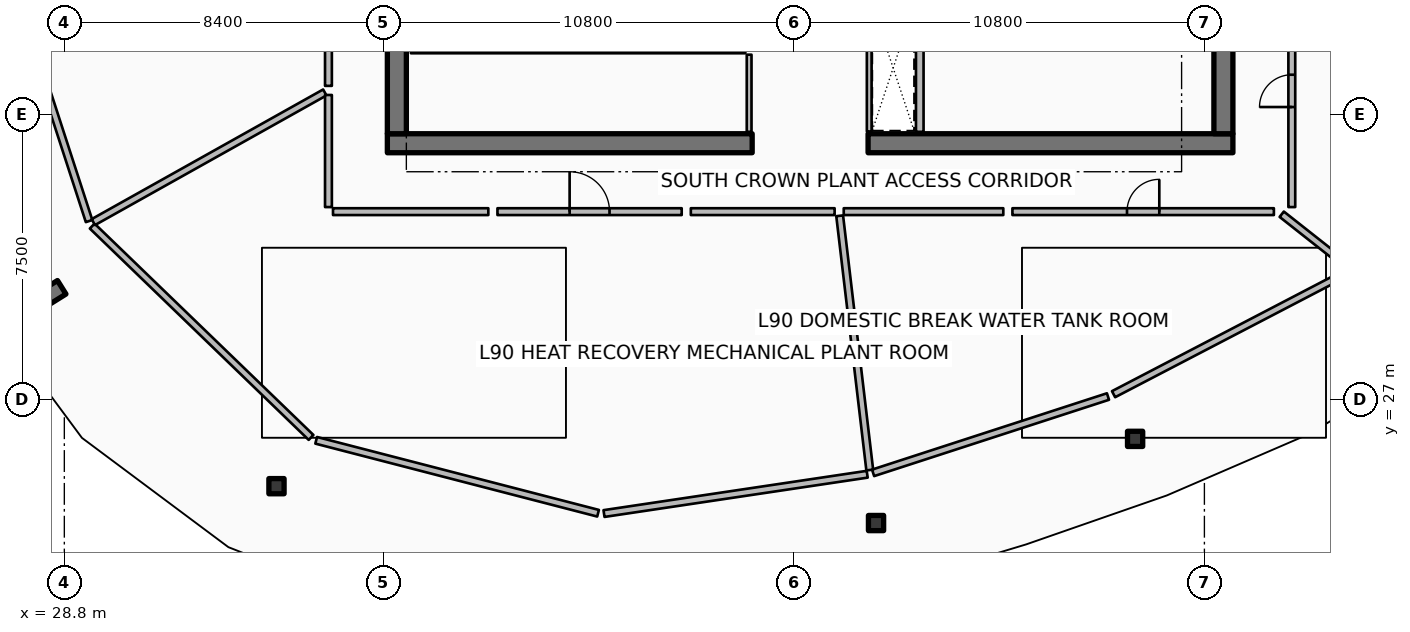
"""IFC4 building model, lengths in metres.
Left out: names, types, materials, properties, quantities, classifications, styles, units other than length and angle.
Written with IfcOpenShell. Run it as: python <this file> out.ifc"""

import sys

from ifc_helpers import new_model, si_unit, direction, frame, frame_2d, origin, origin_2d, place, context, subcontext, project, spatial, rectangle, hollow_rectangle, extrude, element, fill, save


model = new_model("IFC4")
c1 = context("Model", 3, precision=1e-05, world=origin(), true_north=direction((0.0, 1.0)))
c2 = subcontext(c1, "Body", "Model", "MODEL_VIEW")
j1 = project(units=[si_unit("LENGTHUNIT", "METRE"), si_unit("PLANEANGLEUNIT", "RADIAN")], contexts=[c1])
p1 = place(None, origin())
s1 = spatial("IfcSite", under=j1, at=p1, CompositionType="ELEMENT")
p2 = place(p1, origin())
s2 = spatial("IfcBuilding", under=s1, at=p2, CompositionType="ELEMENT")
p3 = place(p2, frame((0.0, 0.0, 359.6)))
s3 = spatial("IfcBuildingStorey", under=s2, at=p3, CompositionType="ELEMENT", Elevation=359.6)
p4 = place(p3, frame((37.3, 33.75, 0.0), z_axis=(0.0, 0.0, 1.0), x_axis=(1.0, 0.0, 0.0)))
e1 = element("IfcWall", 1, at=p4, inside=s3, PredefinedType="SHEAR", context=c2, shape_type="SweptSolid", body=[
    extrude(rectangle(XDim=9.6, YDim=0.5, at=frame_2d((4.8, 0.0))), origin(), (0.0, 0.0, 1.0), 3.6),
])
p5 = place(p3, frame((49.95, 33.75, 0.0), z_axis=(0.0, 0.0, 1.0), x_axis=(1.0, 0.0, 0.0)))
e2 = element("IfcWall", 2, at=p5, inside=s3, PredefinedType="SHEAR", context=c2, shape_type="SweptSolid", body=[
    extrude(rectangle(XDim=9.6, YDim=0.5, at=frame_2d((4.8, 0.0))), origin(), (0.0, 0.0, 1.0), 3.6),
])
for number, where, z_axis, x_axis in (
    (3, (37.55, 34.0, 0.0), (0.0, 0.0, 1.0), (0.0, 1.0, 0.0)),
    (4, (59.3, 34.0, 0.0), (0.0, 0.0, 1.0), (0.0, 1.0, 0.0)),
):
    element("IfcWall", number, at=place(p3, frame(where, z_axis=z_axis, x_axis=x_axis)), inside=s3, PredefinedType="SHEAR", context=c2, shape_type="SweptSolid", body=[
        extrude(rectangle(XDim=16.0, YDim=0.5, at=frame_2d((8.0, 0.0))), origin(), (0.0, 0.0, 1.0), 3.6),
    ])
p6 = place(p3, frame((28.731, 29.959, 0.0), z_axis=(0.0, 0.0, 1.0), x_axis=(-0.848033572426, -0.529942506352, 0.0)))
e5 = element("IfcWall", 5, at=p6, inside=s3, PredefinedType="SOLIDWALL", context=c2, shape_type="SweptSolid", body=[
    extrude(rectangle(XDim=3.5, YDim=0.42, at=frame_2d((1.75, 0.0))), origin(), (0.0, 0.0, 1.0), 3.6),
])
for number, where, z_axis, x_axis in (
    (6, (34.383, 24.726, 0.0), (0.0, 0.0, 1.0), (1.0, 0.0, 0.0)),
    (7, (50.159, 23.756, 0.0), (0.0, 0.0, 1.0), (1.0, 0.0, 0.0)),
    (8, (56.977, 25.971, 0.0), (0.0, 0.0, 1.0), (1.0, 0.0, 0.0)),
):
    element("IfcColumn", number, at=place(p3, frame(where, z_axis=z_axis, x_axis=x_axis)), inside=s3, PredefinedType="COLUMN", context=c2, shape_type="SweptSolid", body=[
        extrude(hollow_rectangle(XDim=0.4, YDim=0.4, WallThickness=0.02, InnerFilletRadius=0.02, OuterFilletRadius=0.04, at=origin_2d()), origin(), (0.0, 0.0, 1.0), 3.32),
    ])
p7 = place(p3, frame((51.31, 34.05, 0.0), z_axis=(0.0, 0.0, 1.0), x_axis=(0.0, 1.0, 0.0)))
e9 = element("IfcWall", 9, at=p7, inside=s3, PredefinedType="PARTITIONING", context=c2, shape_type="SweptSolid", body=[
    extrude(rectangle(XDim=3.21, YDim=0.2, at=frame_2d((1.605, 0.0))), origin(), (0.0, 0.0, 1.0), 3.32),
])
p8 = place(p3, frame((46.82, 34.05, 0.0), z_axis=(0.0, 0.0, 1.0), x_axis=(0.0, 1.0, 0.0)))
e10 = element("IfcWall", 10, at=p8, inside=s3, PredefinedType="PARTITIONING", context=c2, shape_type="SweptSolid", body=[
    extrude(rectangle(XDim=2.03, YDim=0.125, at=frame_2d((1.015, 0.0))), origin(), (0.0, 0.0, 1.0), 2.76),
])
p9 = place(p3, frame((37.92, 36.18, 0.0), z_axis=(0.0, 0.0, 1.0), x_axis=(1.0, 0.0, 0.0)))
e11 = element("IfcWall", 11, at=p9, inside=s3, PredefinedType="PARTITIONING", context=c2, shape_type="SweptSolid", body=[
    extrude(rectangle(XDim=8.8, YDim=0.125, at=frame_2d((4.4, 0.0))), origin(), (0.0, 0.0, 1.0), 2.76),
])
p10 = place(p9, frame((3.975, 0.0, 0.0)))
e12 = element("IfcOpeningElement", 12, at=p10, cuts=e11, PredefinedType="OPENING", context=c2, shape_type="SweptSolid", body=[
    extrude(rectangle(XDim=0.85, YDim=2.06, at=frame_2d((0.425, 1.03))), frame((0.0, 0.073, 0.0), z_axis=(0.0, -1.0, 0.0), x_axis=(1.0, 0.0, 0.0)), (0.0, 0.0, 1.0), 0.145),
])
p11 = place(p3, frame((49.98, 34.06, 0.0), z_axis=(0.0, 0.0, 1.0), x_axis=(0.0, 1.0, 0.0)))
e13 = element("IfcWall", 13, at=p11, inside=s3, PredefinedType="PARTITIONING", context=c2, shape_type="SweptSolid", body=[
    extrude(rectangle(XDim=3.4, YDim=0.125, at=frame_2d((1.7, 0.0))), origin(), (0.0, 0.0, 1.0), 2.76),
])
p12 = place(p3, frame((26.941, 39.428, 0.0), z_axis=(0.0, 0.0, 1.0), x_axis=(0.309024234991, -0.951054163646, 0.0)))
e14 = element("IfcWall", 14, at=p12, inside=s3, PredefinedType="PARTITIONING", context=c2, shape_type="SweptSolid", body=[
    extrude(rectangle(XDim=8.124, YDim=0.18, at=frame_2d((4.062, 0.0))), origin(), (0.0, 0.0, 1.0), 2.76),
])
p13 = place(p3, frame((29.533, 31.57, 0.0), z_axis=(0.0, 0.0, 1.0), x_axis=(0.719364153135, -0.694633151516, 0.0)))
e15 = element("IfcWall", 15, at=p13, inside=s3, PredefinedType="PARTITIONING", context=c2, shape_type="SweptSolid", body=[
    extrude(rectangle(XDim=8.006, YDim=0.18, at=frame_2d((4.003, 0.0))), origin(), (0.0, 0.0, 1.0), 2.76),
])
p14 = place(p3, frame((35.427, 25.934, 0.0), z_axis=(0.0, 0.0, 1.0), x_axis=(0.968117205342, -0.250497658115, 0.0)))
e16 = element("IfcWall", 16, at=p14, inside=s3, PredefinedType="PARTITIONING", context=c2, shape_type="SweptSolid", body=[
    extrude(rectangle(XDim=7.662, YDim=0.18, at=frame_2d((3.831, 0.0))), origin(), (0.0, 0.0, 1.0), 2.76),
])
p15 = place(p3, frame((43.001, 24.006, 0.0), z_axis=(0.0, 0.0, 1.0), x_axis=(0.989034336252, 0.147685753256, 0.0)))
e17 = element("IfcWall", 17, at=p15, inside=s3, PredefinedType="PARTITIONING", context=c2, shape_type="SweptSolid", body=[
    extrude(rectangle(XDim=7.003, YDim=0.18, at=frame_2d((3.501, 0.0))), origin(), (0.0, 0.0, 1.0), 2.76),
])
p16 = place(p3, frame((50.082, 25.077, 0.0), z_axis=(0.0, 0.0, 1.0), x_axis=(0.95105283999, 0.309028308649, 0.0)))
e18 = element("IfcWall", 18, at=p16, inside=s3, PredefinedType="PARTITIONING", context=c2, shape_type="SweptSolid", body=[
    extrude(rectangle(XDim=6.499, YDim=0.18, at=frame_2d((3.25, 0.0))), origin(), (0.0, 0.0, 1.0), 2.76),
])
p17 = place(p3, frame((56.41, 27.147, 0.0), z_axis=(0.0, 0.0, 1.0), x_axis=(0.886949494865, 0.461866423935, 0.0)))
e19 = element("IfcWall", 19, at=p17, inside=s3, PredefinedType="PARTITIONING", context=c2, shape_type="SweptSolid", body=[
    extrude(rectangle(XDim=7.002, YDim=0.18, at=frame_2d((3.501, 0.0))), origin(), (0.0, 0.0, 1.0), 2.76),
])
p18 = place(p3, frame((35.75, 40.43, 0.0), z_axis=(0.0, 0.0, 1.0), x_axis=(0.0, -1.0, 0.0)))
e20 = element("IfcWall", 20, at=p18, inside=s3, PredefinedType="PARTITIONING", context=c2, shape_type="SweptSolid", body=[
    extrude(rectangle(XDim=5.17, YDim=0.18, at=frame_2d((2.585, 0.0))), origin(), (0.0, 0.0, 1.0), 2.76),
])
p19 = place(p18, frame((2.16, 0.0, 0.0)))
e21 = element("IfcOpeningElement", 21, at=p19, cuts=e20, PredefinedType="OPENING", context=c2, shape_type="SweptSolid", body=[
    extrude(rectangle(XDim=0.85, YDim=2.06, at=frame_2d((0.425, 1.03))), frame((0.0, 0.1, 0.0), z_axis=(0.0, -1.0, 0.0), x_axis=(1.0, 0.0, 0.0)), (0.0, 0.0, 1.0), 0.2),
])
p20 = place(p3, frame((35.654, 35.086, 0.0), z_axis=(0.0, 0.0, 1.0), x_axis=(-0.872497667023, -0.488618277432, 0.0)))
e22 = element("IfcWall", 22, at=p20, inside=s3, PredefinedType="PARTITIONING", context=c2, shape_type="SweptSolid", body=[
    extrude(rectangle(XDim=6.981, YDim=0.18, at=frame_2d((3.491, 0.0))), origin(), (0.0, 0.0, 1.0), 2.76),
])
p21 = place(p3, frame((35.75, 35.02, 0.0), z_axis=(0.0, 0.0, 1.0), x_axis=(0.0, -1.0, 0.0)))
e23 = element("IfcWall", 23, at=p21, inside=s3, PredefinedType="PARTITIONING", context=c2, shape_type="SweptSolid", body=[
    extrude(rectangle(XDim=2.95, YDim=0.18, at=frame_2d((1.475, 0.0))), origin(), (0.0, 0.0, 1.0), 2.76),
])
p22 = place(p3, frame((35.87, 31.95, 0.0), z_axis=(0.0, 0.0, 1.0), x_axis=(1.0, 0.0, 0.0)))
e24 = element("IfcWall", 24, at=p22, inside=s3, PredefinedType="PARTITIONING", context=c2, shape_type="SweptSolid", body=[
    extrude(rectangle(XDim=4.087, YDim=0.18, at=frame_2d((2.043, 0.0))), origin(), (0.0, 0.0, 1.0), 2.76),
])
p23 = place(p3, frame((40.197, 31.95, 0.0), z_axis=(0.0, 0.0, 1.0), x_axis=(1.0, 0.0, 0.0)))
e25 = element("IfcWall", 25, at=p23, inside=s3, PredefinedType="PARTITIONING", context=c2, shape_type="SweptSolid", body=[
    extrude(rectangle(XDim=4.848, YDim=0.18, at=frame_2d((2.424, 0.0))), origin(), (0.0, 0.0, 1.0), 2.76),
])
p24 = place(p23, frame((1.899, 0.0, 0.0)))
e26 = element("IfcOpeningElement", 26, at=p24, cuts=e25, PredefinedType="OPENING", context=c2, shape_type="SweptSolid", body=[
    extrude(rectangle(XDim=1.05, YDim=2.1, at=frame_2d((0.525, 1.05))), frame((0.0, 0.1, 0.0), z_axis=(0.0, -1.0, 0.0), x_axis=(1.0, 0.0, 0.0)), (0.0, 0.0, 1.0), 0.2),
])
p25 = place(p3, frame((45.286, 31.95, 0.0), z_axis=(0.0, 0.0, 1.0), x_axis=(1.0, 0.0, 0.0)))
e27 = element("IfcWall", 27, at=p25, inside=s3, PredefinedType="PARTITIONING", context=c2, shape_type="SweptSolid", body=[
    extrude(rectangle(XDim=3.784, YDim=0.18, at=frame_2d((1.892, 0.0))), origin(), (0.0, 0.0, 1.0), 2.76),
])
p26 = place(p3, frame((49.202, 31.841, 0.0), z_axis=(0.0, 0.0, 1.0), x_axis=(0.117541495417, -0.993067971921, 0.0)))
e28 = element("IfcWall", 28, at=p26, inside=s3, PredefinedType="PARTITIONING", context=c2, shape_type="SweptSolid", body=[
    extrude(rectangle(XDim=6.736, YDim=0.18, at=frame_2d((3.368, 0.0))), origin(), (0.0, 0.0, 1.0), 2.76),
])
p27 = place(p3, frame((49.31, 31.95, 0.0), z_axis=(0.0, 0.0, 1.0), x_axis=(1.0, 0.0, 0.0)))
e29 = element("IfcWall", 29, at=p27, inside=s3, PredefinedType="PARTITIONING", context=c2, shape_type="SweptSolid", body=[
    extrude(rectangle(XDim=4.199, YDim=0.18, at=frame_2d((2.099, 0.0))), origin(), (0.0, 0.0, 1.0), 2.76),
])
p28 = place(p3, frame((53.748, 31.95, 0.0), z_axis=(0.0, 0.0, 1.0), x_axis=(1.0, 0.0, 0.0)))
e30 = element("IfcWall", 30, at=p28, inside=s3, PredefinedType="PARTITIONING", context=c2, shape_type="SweptSolid", body=[
    extrude(rectangle(XDim=6.88, YDim=0.18, at=frame_2d((3.44, 0.0))), origin(), (0.0, 0.0, 1.0), 2.76),
])
p29 = place(p28, frame((3.015, 0.0, 0.0)))
e31 = element("IfcOpeningElement", 31, at=p29, cuts=e30, PredefinedType="OPENING", context=c2, shape_type="SweptSolid", body=[
    extrude(rectangle(XDim=0.85, YDim=2.06, at=frame_2d((0.425, 1.03))), frame((0.0, 0.1, 0.0), z_axis=(0.0, -1.0, 0.0), x_axis=(1.0, 0.0, 0.0)), (0.0, 0.0, 1.0), 0.2),
])
p30 = place(p3, frame((60.835, 31.882, 0.0), z_axis=(0.0, 0.0, 1.0), x_axis=(0.785329646864, -0.619077818821, 0.0)))
e32 = element("IfcWall", 32, at=p30, inside=s3, PredefinedType="PARTITIONING", context=c2, shape_type="SweptSolid", body=[
    extrude(rectangle(XDim=2.264, YDim=0.18, at=frame_2d((1.132, 0.0))), origin(), (0.0, 0.0, 1.0), 2.76),
])
p31 = place(p3, frame((61.1, 32.07, 0.0), z_axis=(0.0, 0.0, 1.0), x_axis=(0.0, 1.0, 0.0)))
e33 = element("IfcWall", 33, at=p31, inside=s3, PredefinedType="PARTITIONING", context=c2, shape_type="SweptSolid", body=[
    extrude(rectangle(XDim=6.115, YDim=0.18, at=frame_2d((3.058, 0.0))), origin(), (0.0, 0.0, 1.0), 2.76),
])
p32 = place(p31, frame((2.633, 0.0, 0.0)))
e34 = element("IfcOpeningElement", 34, at=p32, cuts=e33, PredefinedType="OPENING", context=c2, shape_type="SweptSolid", body=[
    extrude(rectangle(XDim=0.85, YDim=2.06, at=frame_2d((0.425, 1.03))), frame((0.0, 0.1, 0.0), z_axis=(0.0, -1.0, 0.0), x_axis=(1.0, 0.0, 0.0)), (0.0, 0.0, 1.0), 0.2),
])
p33 = place(p24, origin())
e35 = element("IfcDoor", 35, at=p33, inside=s3, OperationType="SINGLE_SWING_LEFT", PredefinedType="DOOR", context=c2, shape_type="SweptSolid", body=[
    extrude(rectangle(XDim=1.05, YDim=2.1, at=frame_2d((0.525, 1.05))), frame((0.0, 0.025, 0.0), z_axis=(0.0, -1.0, 0.0), x_axis=(1.0, 0.0, 0.0)), (0.0, 0.0, 1.0), 0.05),
])
fill(e26, e35)
p34 = place(p29, origin())
e36 = element("IfcDoor", 36, at=p34, inside=s3, OperationType="SINGLE_SWING_RIGHT", PredefinedType="DOOR", context=c2, shape_type="SweptSolid", body=[
    extrude(rectangle(XDim=0.85, YDim=2.06, at=frame_2d((0.425, 1.03))), frame((0.0, 0.025, 0.0), z_axis=(0.0, -1.0, 0.0), x_axis=(1.0, 0.0, 0.0)), (0.0, 0.0, 1.0), 0.05),
])
fill(e31, e36)
p35 = place(p32, origin())
e37 = element("IfcDoor", 37, at=p35, inside=s3, OperationType="SINGLE_SWING_LEFT", PredefinedType="DOOR", context=c2, shape_type="SweptSolid", body=[
    extrude(rectangle(XDim=0.85, YDim=2.06, at=frame_2d((0.425, 1.03))), frame((0.0, 0.025, 0.0), z_axis=(0.0, -1.0, 0.0), x_axis=(1.0, 0.0, 0.0)), (0.0, 0.0, 1.0), 0.05),
])
fill(e34, e37)
save(model, sys.argv[1])
